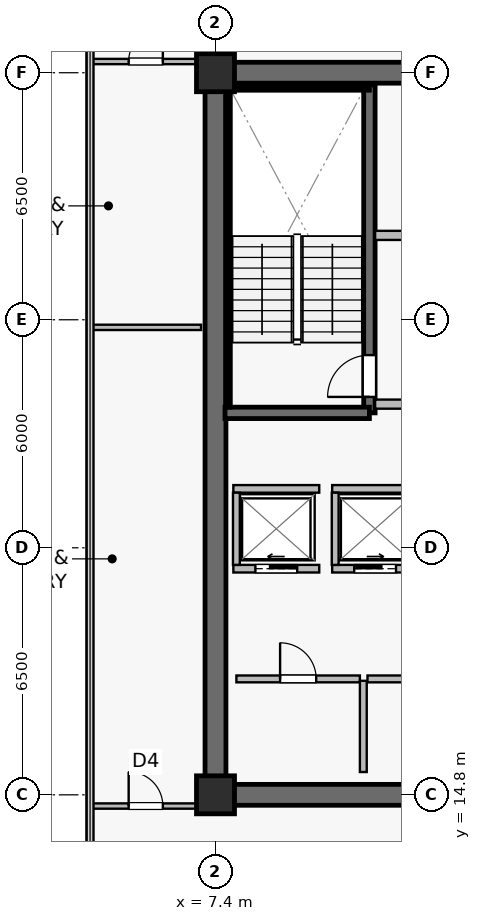
"""IFC4 building model, lengths in metres.
Left out: names, types, materials, properties, quantities, classifications, styles, units other than length and angle.
Written with IfcOpenShell. Run it as: python <this file> out.ifc"""

import sys

from ifc_helpers import new_model, si_unit, direction, frame, frame_2d, origin, origin_2d, place, context, subcontext, project, spatial, rectangle, extrude, source, transform, mapped, element, fill, save


model = new_model("IFC4")
c1 = context("Model", 3, precision=1e-05, world=origin(), true_north=direction((0.0, 1.0)))
c2 = subcontext(c1, "Body", "Model", "MODEL_VIEW")
j1 = project(units=[si_unit("LENGTHUNIT", "METRE"), si_unit("PLANEANGLEUNIT", "RADIAN")], contexts=[c1])
p1 = place(None, origin())
s1 = spatial("IfcSite", under=j1, at=p1, CompositionType="ELEMENT")
p2 = place(p1, origin())
s2 = spatial("IfcBuilding", under=s1, at=p2, CompositionType="ELEMENT")
p3 = place(p2, frame((0.0, 0.0, 275.2)))
s3 = spatial("IfcBuildingStorey", under=s2, at=p3, CompositionType="ELEMENT", Elevation=275.2)
p4 = place(p3, frame((7.125, 14.8, 0.0), z_axis=(0.0, 0.0, 1.0), x_axis=(1.0, 0.0, 0.0)))
e1 = element("IfcWall", 1, at=p4, inside=s3, PredefinedType="SHEAR", context=c2, shape_type="SweptSolid", body=[
    extrude(rectangle(XDim=15.35, YDim=0.55, at=frame_2d((7.675, 0.0))), origin(), (0.0, 0.0, 1.0), 3.8),
])
p5 = place(p3, frame((7.125, 33.8, 0.0), z_axis=(0.0, 0.0, 1.0), x_axis=(1.0, 0.0, 0.0)))
e2 = element("IfcWall", 2, at=p5, inside=s3, PredefinedType="SHEAR", context=c2, shape_type="SweptSolid", body=[
    extrude(rectangle(XDim=15.35, YDim=0.55, at=frame_2d((7.675, 0.0))), origin(), (0.0, 0.0, 1.0), 3.8),
])
p6 = place(p5, frame((5.2, 0.0, 0.0)))
e3 = element("IfcOpeningElement", 3, at=p6, cuts=e2, PredefinedType="OPENING", context=c2, shape_type="SweptSolid", body=[
    extrude(rectangle(XDim=0.95, YDim=2.15, at=frame_2d((0.475, 1.075))), frame((0.0, 0.285, 0.0), z_axis=(0.0, -1.0, 0.0), x_axis=(1.0, 0.0, 0.0)), (0.0, 0.0, 1.0), 0.57),
])
p7 = place(p5, frame((7.715, 0.0, 0.0)))
e4 = element("IfcOpeningElement", 4, at=p7, cuts=e2, PredefinedType="OPENING", context=c2, shape_type="SweptSolid", body=[
    extrude(rectangle(XDim=0.95, YDim=2.15, at=frame_2d((0.475, 1.075))), frame((0.0, 0.285, 0.0), z_axis=(0.0, -1.0, 0.0), x_axis=(1.0, 0.0, 0.0)), (0.0, 0.0, 1.0), 0.57),
])
p8 = place(p5, frame((10.265, 0.0, 0.0)))
e5 = element("IfcOpeningElement", 5, at=p8, cuts=e2, PredefinedType="OPENING", context=c2, shape_type="SweptSolid", body=[
    extrude(rectangle(XDim=0.95, YDim=2.15, at=frame_2d((0.475, 1.075))), frame((0.0, 0.285, 0.0), z_axis=(0.0, -1.0, 0.0), x_axis=(1.0, 0.0, 0.0)), (0.0, 0.0, 1.0), 0.57),
])
p9 = place(p5, frame((12.815, 0.0, 0.0)))
e6 = element("IfcOpeningElement", 6, at=p9, cuts=e2, PredefinedType="OPENING", context=c2, shape_type="SweptSolid", body=[
    extrude(rectangle(XDim=0.95, YDim=2.15, at=frame_2d((0.475, 1.075))), frame((0.0, 0.285, 0.0), z_axis=(0.0, -1.0, 0.0), x_axis=(1.0, 0.0, 0.0)), (0.0, 0.0, 1.0), 0.57),
])
p10 = place(p3, frame((7.4, 15.075, 0.0), z_axis=(0.0, 0.0, 1.0), x_axis=(0.0, 1.0, 0.0)))
e7 = element("IfcWall", 7, at=p10, inside=s3, PredefinedType="SHEAR", context=c2, shape_type="SweptSolid", body=[
    extrude(rectangle(XDim=18.45, YDim=0.55, at=frame_2d((9.225, 0.0))), origin(), (0.0, 0.0, 1.0), 3.8),
])
p11 = place(p3, frame((11.45, 24.85, 0.0), z_axis=(0.0, 0.0, 1.0), x_axis=(0.0, 1.0, 0.0)))
e8 = element("IfcWall", 8, at=p11, inside=s3, PredefinedType="SHEAR", context=c2, shape_type="SweptSolid", body=[
    extrude(rectangle(XDim=8.63, YDim=0.3, at=frame_2d((4.315, 0.0))), origin(), (0.0, 0.0, 1.0), 3.8),
])
p12 = place(p11, frame((0.42, 0.0, 0.0)))
e9 = element("IfcOpeningElement", 9, at=p12, cuts=e8, PredefinedType="OPENING", context=c2, shape_type="SweptSolid", body=[
    extrude(rectangle(XDim=1.1, YDim=2.15, at=frame_2d((0.55, 1.075))), frame((0.0, 0.16, 0.0), z_axis=(0.0, -1.0, 0.0), x_axis=(1.0, 0.0, 0.0)), (0.0, 0.0, 1.0), 0.32),
])
p13 = place(p3, frame((7.65, 24.85, 0.0), z_axis=(0.0, 0.0, 1.0), x_axis=(1.0, 0.0, 0.0)))
e10 = element("IfcWall", 10, at=p13, inside=s3, PredefinedType="SHEAR", context=c2, shape_type="SweptSolid", body=[
    extrude(rectangle(XDim=3.8, YDim=0.3, at=frame_2d((1.9, 0.0))), origin(), (0.0, 0.0, 1.0), 3.8),
])
p14 = place(p3, frame((7.73, 33.4, 0.0), z_axis=(0.0, 0.0, 1.0), x_axis=(1.0, 0.0, 0.0)))
e11 = element("IfcWall", 11, at=p14, inside=s3, PredefinedType="SOLIDWALL", context=c2, shape_type="SweptSolid", body=[
    extrude(rectangle(XDim=3.72, YDim=0.12, at=frame_2d((1.86, 0.0))), origin(), (0.0, 0.0, 1.0), 3.8),
])
p15 = place(p3, frame((7.73, 25.0, 0.0), z_axis=(0.0, 0.0, 1.0), x_axis=(0.0, 1.0, 0.0)))
e12 = element("IfcWall", 12, at=p15, inside=s3, PredefinedType="SOLIDWALL", context=c2, shape_type="SweptSolid", body=[
    extrude(rectangle(XDim=8.32, YDim=0.12, at=frame_2d((4.16, 0.0))), origin(), (0.0, 0.0, 1.0), 3.8),
])
m1 = source(origin(), c2, "Body", "SweptSolid", [
    extrude(rectangle(XDim=1.0, YDim=1.0, at=origin_2d()), origin(), (0.0, 0.0, 1.0), 4.1),
])
for number, where, z_axis, x_axis in (
    (13, (7.4, 14.8, 0.0), (0.0, 0.0, 1.0), (1.0, 0.0, 0.0)),
    (14, (7.4, 33.8, 0.0), (0.0, 0.0, 1.0), (1.0, 0.0, 0.0)),
):
    element("IfcColumn", number, at=place(p3, frame(where, z_axis=z_axis, x_axis=x_axis)), inside=s3, PredefinedType="COLUMN", context=c2, shape_type="MappedRepresentation", body=[
        mapped(m1, transform((0.0, 0.0, 0.0), scale=1.0)),
    ])
p16 = place(p3, frame((11.6, 25.08, 0.0), z_axis=(0.0, 0.0, 1.0), x_axis=(1.0, 0.0, 0.0)))
e15 = element("IfcWall", 15, at=p16, inside=s3, PredefinedType="SOLIDWALL", context=c2, shape_type="SweptSolid", body=[
    extrude(rectangle(XDim=6.92, YDim=0.24, at=frame_2d((3.46, 0.0))), origin(), (0.0, 0.0, 1.0), 3.197),
])
p17 = place(p16, frame((2.6, 0.0, 0.0)))
e16 = element("IfcOpeningElement", 16, at=p17, cuts=e15, PredefinedType="OPENING", context=c2, shape_type="SweptSolid", body=[
    extrude(rectangle(XDim=1.2, YDim=2.16, at=frame_2d((0.6, 1.08))), frame((0.0, 0.13, 0.0), z_axis=(0.0, -1.0, 0.0), x_axis=(1.0, 0.0, 0.0)), (0.0, 0.0, 1.0), 0.26),
])
p18 = place(p3, frame((11.6, 29.52, 0.0), z_axis=(0.0, 0.0, 1.0), x_axis=(1.0, 0.0, 0.0)))
e17 = element("IfcWall", 17, at=p18, inside=s3, PredefinedType="SOLIDWALL", context=c2, shape_type="SweptSolid", body=[
    extrude(rectangle(XDim=6.92, YDim=0.24, at=frame_2d((3.46, 0.0))), origin(), (0.0, 0.0, 1.0), 3.197),
])
p19 = place(p3, frame((7.87, 20.75, 0.0), z_axis=(0.0, 0.0, 1.0), x_axis=(1.0, 0.0, 0.0)))
e18 = element("IfcWall", 18, at=p19, inside=s3, PredefinedType="SOLIDWALL", context=c2, shape_type="SweptSolid", body=[
    extrude(rectangle(XDim=2.26, YDim=0.2, at=frame_2d((1.13, 0.0))), origin(), (0.0, 0.0, 1.0), 3.8),
])
p20 = place(p19, frame((0.58, 0.0, 0.0)))
e19 = element("IfcOpeningElement", 19, at=p20, cuts=e18, PredefinedType="OPENING", context=c2, shape_type="SweptSolid", body=[
    extrude(rectangle(XDim=1.1, YDim=2.22, at=frame_2d((0.55, 1.11))), frame((0.0, 0.11, 0.0), z_axis=(0.0, -1.0, 0.0), x_axis=(1.0, 0.0, 0.0)), (0.0, 0.0, 1.0), 0.22),
])
p21 = place(p3, frame((7.87, 22.85, 0.0), z_axis=(0.0, 0.0, 1.0), x_axis=(1.0, 0.0, 0.0)))
e20 = element("IfcWall", 20, at=p21, inside=s3, PredefinedType="SOLIDWALL", context=c2, shape_type="SweptSolid", body=[
    extrude(rectangle(XDim=2.26, YDim=0.2, at=frame_2d((1.13, 0.0))), origin(), (0.0, 0.0, 1.0), 3.8),
])
p22 = place(p3, frame((7.95, 20.85, 0.0), z_axis=(0.0, 0.0, 1.0), x_axis=(0.0, 1.0, 0.0)))
e21 = element("IfcWall", 21, at=p22, inside=s3, PredefinedType="SOLIDWALL", context=c2, shape_type="SweptSolid", body=[
    extrude(rectangle(XDim=1.9, YDim=0.18, at=frame_2d((0.95, 0.0))), origin(), (0.0, 0.0, 1.0), 3.8),
])
p23 = place(p3, frame((10.47, 20.75, 0.0), z_axis=(0.0, 0.0, 1.0), x_axis=(1.0, 0.0, 0.0)))
e22 = element("IfcWall", 22, at=p23, inside=s3, PredefinedType="SOLIDWALL", context=c2, shape_type="SweptSolid", body=[
    extrude(rectangle(XDim=2.26, YDim=0.2, at=frame_2d((1.13, 0.0))), origin(), (0.0, 0.0, 1.0), 3.8),
])
p24 = place(p23, frame((0.58, 0.0, 0.0)))
e23 = element("IfcOpeningElement", 23, at=p24, cuts=e22, PredefinedType="OPENING", context=c2, shape_type="SweptSolid", body=[
    extrude(rectangle(XDim=1.1, YDim=2.22, at=frame_2d((0.55, 1.11))), frame((0.0, 0.11, 0.0), z_axis=(0.0, -1.0, 0.0), x_axis=(1.0, 0.0, 0.0)), (0.0, 0.0, 1.0), 0.22),
])
p25 = place(p3, frame((10.47, 22.85, 0.0), z_axis=(0.0, 0.0, 1.0), x_axis=(1.0, 0.0, 0.0)))
e24 = element("IfcWall", 24, at=p25, inside=s3, PredefinedType="SOLIDWALL", context=c2, shape_type="SweptSolid", body=[
    extrude(rectangle(XDim=2.26, YDim=0.2, at=frame_2d((1.13, 0.0))), origin(), (0.0, 0.0, 1.0), 3.8),
])
p26 = place(p3, frame((10.55, 20.85, 0.0), z_axis=(0.0, 0.0, 1.0), x_axis=(0.0, 1.0, 0.0)))
e25 = element("IfcWall", 25, at=p26, inside=s3, PredefinedType="SOLIDWALL", context=c2, shape_type="SweptSolid", body=[
    extrude(rectangle(XDim=1.9, YDim=0.18, at=frame_2d((0.95, 0.0))), origin(), (0.0, 0.0, 1.0), 3.8),
])
p27 = place(p3, frame((7.95, 17.85, 0.0), z_axis=(0.0, 0.0, 1.0), x_axis=(1.0, 0.0, 0.0)))
e26 = element("IfcWall", 26, at=p27, inside=s3, PredefinedType="SOLIDWALL", context=c2, shape_type="SweptSolid", body=[
    extrude(rectangle(XDim=3.25, YDim=0.18, at=frame_2d((1.625, 0.0))), origin(), (0.0, 0.0, 1.0), 3.8),
])
p28 = place(p27, frame((1.15, 0.0, 0.0)))
e27 = element("IfcOpeningElement", 27, at=p28, cuts=e26, PredefinedType="OPENING", context=c2, shape_type="SweptSolid", body=[
    extrude(rectangle(XDim=0.95, YDim=2.15, at=frame_2d((0.475, 1.075))), frame((0.0, 0.1, 0.0), z_axis=(0.0, -1.0, 0.0), x_axis=(1.0, 0.0, 0.0)), (0.0, 0.0, 1.0), 0.2),
])
p29 = place(p3, frame((11.29, 15.4, 0.0), z_axis=(0.0, 0.0, 1.0), x_axis=(0.0, 1.0, 0.0)))
e28 = element("IfcWall", 28, at=p29, inside=s3, PredefinedType="SOLIDWALL", context=c2, shape_type="SweptSolid", body=[
    extrude(rectangle(XDim=2.4, YDim=0.18, at=frame_2d((1.2, 0.0))), origin(), (0.0, 0.0, 1.0), 3.8),
])
p30 = place(p3, frame((11.4, 17.85, 0.0), z_axis=(0.0, 0.0, 1.0), x_axis=(1.0, 0.0, 0.0)))
e29 = element("IfcWall", 29, at=p30, inside=s3, PredefinedType="SOLIDWALL", context=c2, shape_type="SweptSolid", body=[
    extrude(rectangle(XDim=3.3, YDim=0.18, at=frame_2d((1.65, 0.0))), origin(), (0.0, 0.0, 1.0), 3.197),
])
p31 = place(p30, frame((1.175, 0.0, 0.0)))
e30 = element("IfcOpeningElement", 30, at=p31, cuts=e29, PredefinedType="OPENING", context=c2, shape_type="SweptSolid", body=[
    extrude(rectangle(XDim=0.95, YDim=2.15, at=frame_2d((0.475, 1.075))), frame((0.0, 0.1, 0.0), z_axis=(0.0, -1.0, 0.0), x_axis=(1.0, 0.0, 0.0)), (0.0, 0.0, 1.0), 0.2),
])
p32 = place(p3, frame((4.11, 27.1, 0.0), z_axis=(0.0, 0.0, 1.0), x_axis=(1.0, 0.0, 0.0)))
e31 = element("IfcWall", 31, at=p32, inside=s3, PredefinedType="PARTITIONING", context=c2, shape_type="SweptSolid", body=[
    extrude(rectangle(XDim=2.91, YDim=0.14, at=frame_2d((1.455, 0.0))), origin(), (0.0, 0.0, 1.0), 3.8),
])
p33 = place(p3, frame((4.11, 14.505, 0.0), z_axis=(0.0, 0.0, 1.0), x_axis=(1.0, 0.0, 0.0)))
e32 = element("IfcWall", 32, at=p33, inside=s3, PredefinedType="PARTITIONING", context=c2, shape_type="SweptSolid", body=[
    extrude(rectangle(XDim=2.91, YDim=0.14, at=frame_2d((1.455, 0.0))), origin(), (0.0, 0.0, 1.0), 3.8),
])
p34 = place(p33, frame((1.005, 0.0, 0.0)))
e33 = element("IfcOpeningElement", 33, at=p34, cuts=e32, PredefinedType="OPENING", context=c2, shape_type="SweptSolid", body=[
    extrude(rectangle(XDim=0.9, YDim=2.1, at=frame_2d((0.45, 1.05))), frame((0.0, 0.08, 0.0), z_axis=(0.0, -1.0, 0.0), x_axis=(1.0, 0.0, 0.0)), (0.0, 0.0, 1.0), 0.16),
])
p35 = place(p3, frame((4.11, 34.095, 0.0), z_axis=(0.0, 0.0, 1.0), x_axis=(1.0, 0.0, 0.0)))
e34 = element("IfcWall", 34, at=p35, inside=s3, PredefinedType="PARTITIONING", context=c2, shape_type="SweptSolid", body=[
    extrude(rectangle(XDim=2.91, YDim=0.14, at=frame_2d((1.455, 0.0))), origin(), (0.0, 0.0, 1.0), 3.8),
])
p36 = place(p35, frame((1.005, 0.0, 0.0)))
e35 = element("IfcOpeningElement", 35, at=p36, cuts=e34, PredefinedType="OPENING", context=c2, shape_type="SweptSolid", body=[
    extrude(rectangle(XDim=0.9, YDim=2.1, at=frame_2d((0.45, 1.05))), frame((0.0, 0.08, 0.0), z_axis=(0.0, -1.0, 0.0), x_axis=(1.0, 0.0, 0.0)), (0.0, 0.0, 1.0), 0.16),
])
m2 = source(origin(), c2, "Body", "SweptSolid", [
    extrude(rectangle(XDim=1.1, YDim=2.15, at=frame_2d((0.55, 1.075))), frame((0.0, 0.025, 0.0), z_axis=(0.0, -1.0, 0.0), x_axis=(1.0, 0.0, 0.0)), (0.0, 0.0, 1.0), 0.05),
])
p37 = place(p12, origin())
e36 = element("IfcDoor", 36, at=p37, inside=s3, OperationType="SINGLE_SWING_LEFT", PredefinedType="DOOR", context=c2, shape_type="MappedRepresentation", body=[
    mapped(m2, transform((0.0, 0.0, 0.0), scale=1.0)),
])
fill(e9, e36)
m3 = source(origin(), c2, "Body", "SweptSolid", [
    extrude(rectangle(XDim=1.1, YDim=2.22, at=frame_2d((0.55, 1.11))), frame((0.0, 0.025, 0.0), z_axis=(0.0, -1.0, 0.0), x_axis=(1.0, 0.0, 0.0)), (0.0, 0.0, 1.0), 0.05),
])
p38 = place(p20, origin())
e37 = element("IfcDoor", 37, at=p38, inside=s3, OperationType="SLIDING_TO_LEFT", PredefinedType="USERDEFINED", context=c2, shape_type="MappedRepresentation", body=[
    mapped(m3, transform((0.0, 0.0, 0.0), scale=1.0)),
])
fill(e19, e37)
p39 = place(p24, origin())
e38 = element("IfcDoor", 38, at=p39, inside=s3, OperationType="SLIDING_TO_RIGHT", PredefinedType="USERDEFINED", context=c2, shape_type="MappedRepresentation", body=[
    mapped(m3, transform((0.0, 0.0, 0.0), scale=1.0)),
])
fill(e23, e38)
m4 = source(origin(), c2, "Body", "SweptSolid", [
    extrude(rectangle(XDim=0.95, YDim=2.15, at=frame_2d((0.475, 1.075))), frame((0.0, 0.025, 0.0), z_axis=(0.0, -1.0, 0.0), x_axis=(1.0, 0.0, 0.0)), (0.0, 0.0, 1.0), 0.05),
])
p40 = place(p28, origin())
e39 = element("IfcDoor", 39, at=p40, inside=s3, OperationType="SINGLE_SWING_LEFT", PredefinedType="DOOR", context=c2, shape_type="MappedRepresentation", body=[
    mapped(m4, transform((0.0, 0.0, 0.0), scale=1.0)),
])
fill(e27, e39)
m5 = source(origin(), c2, "Body", "SweptSolid", [
    extrude(rectangle(XDim=0.9, YDim=2.1, at=frame_2d((0.45, 1.05))), frame((0.0, 0.025, 0.0), z_axis=(0.0, -1.0, 0.0), x_axis=(1.0, 0.0, 0.0)), (0.0, 0.0, 1.0), 0.05),
])
p41 = place(p34, origin())
e40 = element("IfcDoor", 40, at=p41, inside=s3, OperationType="SINGLE_SWING_LEFT", PredefinedType="DOOR", context=c2, shape_type="MappedRepresentation", body=[
    mapped(m5, transform((0.0, 0.0, 0.0), scale=1.0)),
])
fill(e33, e40)
p42 = place(p36, origin())
e41 = element("IfcDoor", 41, at=p42, inside=s3, OperationType="SINGLE_SWING_RIGHT", PredefinedType="DOOR", context=c2, shape_type="MappedRepresentation", body=[
    mapped(m5, transform((0.0, 0.0, 0.0), scale=1.0)),
])
fill(e35, e41)
save(model, sys.argv[1])
